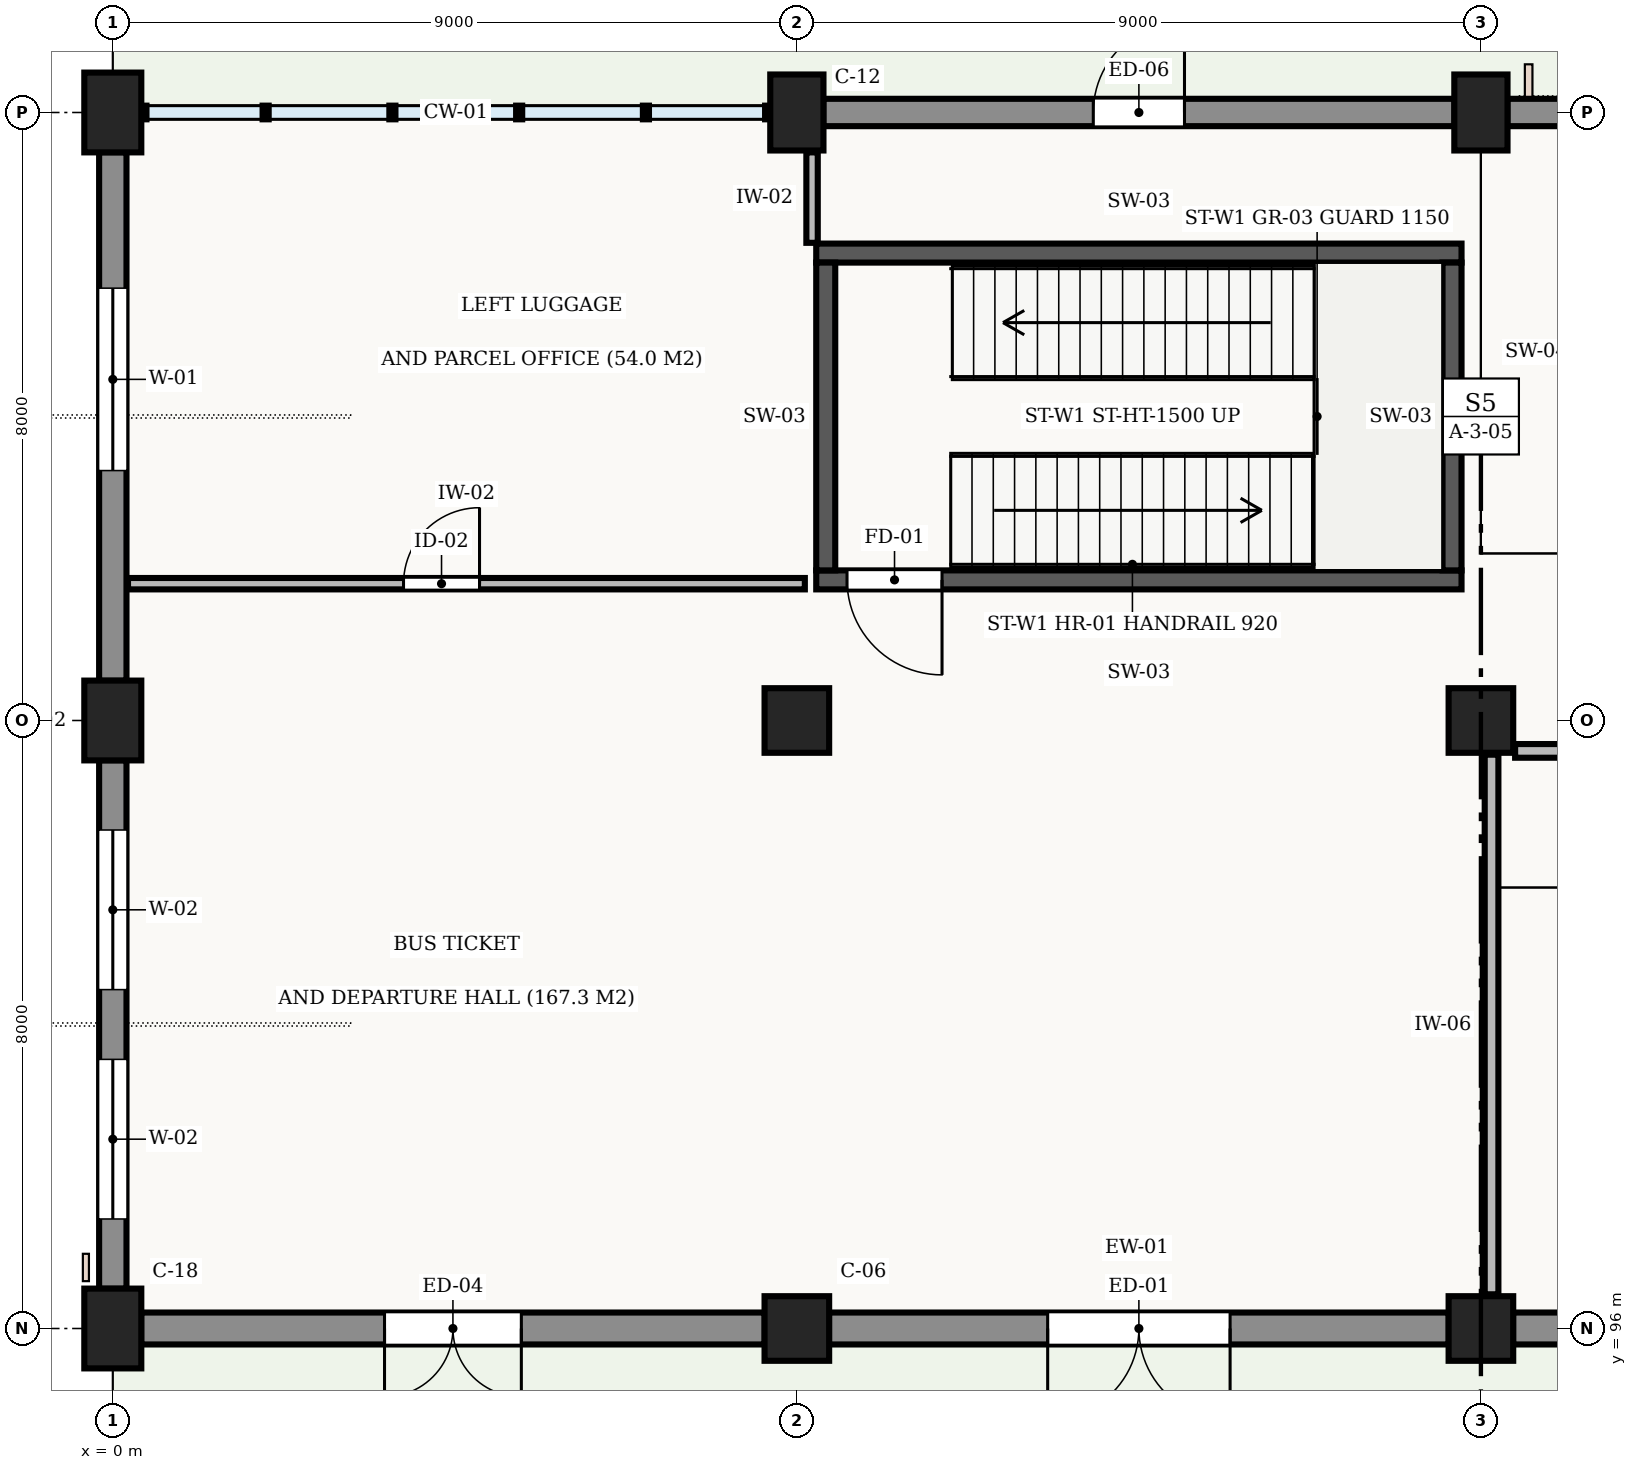
"""IFC4 building model, lengths in metres.
Left out: names, types, materials, properties, quantities, classifications, styles, units other than length and angle.
Written with IfcOpenShell. Run it as: python <this file> out.ifc"""

import sys

from ifc_helpers import new_model, si_unit, direction, frame, frame_2d, origin, origin_2d, place, context, subcontext, project, spatial, rectangle, extrude, element, fill, save


model = new_model("IFC4")
c1 = context("Model", 3, precision=1e-05, world=origin(), true_north=direction((0.0, 1.0)))
c2 = subcontext(c1, "Body", "Model", "MODEL_VIEW")
j1 = project(units=[si_unit("LENGTHUNIT", "METRE"), si_unit("PLANEANGLEUNIT", "RADIAN")], contexts=[c1])
p1 = place(None, origin())
s1 = spatial("IfcSite", under=j1, at=p1, CompositionType="ELEMENT")
p2 = place(p1, origin())
s2 = spatial("IfcBuilding", under=s1, at=p2, CompositionType="ELEMENT")
p3 = place(p2, origin())
s3 = spatial("IfcBuildingStorey", under=s2, at=p3, CompositionType="ELEMENT", Elevation=0.0)
for number, where, z_axis, x_axis in (
    (1, (0.0, 96.0, -0.42), (0.0, 0.0, 1.0), (1.0, 0.0, 0.0)),
    (2, (0.0, 104.0, -0.42), (0.0, 0.0, 1.0), (1.0, 0.0, 0.0)),
    (3, (0.0, 112.0, -0.42), (0.0, 0.0, 1.0), (1.0, 0.0, 0.0)),
):
    element("IfcColumn", number, at=place(p3, frame(where, z_axis=z_axis, x_axis=x_axis)), inside=s3, PredefinedType="COLUMN", context=c2, shape_type="SweptSolid", body=[
        extrude(rectangle(XDim=0.75, YDim=1.05, at=origin_2d()), origin(), (0.0, 0.0, 1.0), 5.82),
    ])
for number, where, z_axis, x_axis in (
    (4, (9.0, 96.0, -0.42), (0.0, 0.0, 1.0), (1.0, 0.0, 0.0)),
    (5, (9.0, 104.0, -0.42), (0.0, 0.0, 1.0), (1.0, 0.0, 0.0)),
):
    element("IfcColumn", number, at=place(p3, frame(where, z_axis=z_axis, x_axis=x_axis)), inside=s3, PredefinedType="COLUMN", context=c2, shape_type="SweptSolid", body=[
        extrude(rectangle(XDim=0.85, YDim=0.85, at=origin_2d()), origin(), (0.0, 0.0, 1.0), 5.82),
    ])
p4 = place(p3, frame((9.0, 112.0, -0.42), z_axis=(0.0, 0.0, 1.0), x_axis=(1.0, 0.0, 0.0)))
e6 = element("IfcColumn", 6, at=p4, inside=s3, PredefinedType="COLUMN", context=c2, shape_type="SweptSolid", body=[
    extrude(rectangle(XDim=0.7, YDim=1.0, at=origin_2d()), origin(), (0.0, 0.0, 1.0), 5.82),
])
for number, where, z_axis, x_axis in (
    (7, (18.0, 96.0, -0.42), (0.0, 0.0, 1.0), (1.0, 0.0, 0.0)),
    (8, (18.0, 104.0, -0.42), (0.0, 0.0, 1.0), (1.0, 0.0, 0.0)),
):
    element("IfcColumn", number, at=place(p3, frame(where, z_axis=z_axis, x_axis=x_axis)), inside=s3, PredefinedType="COLUMN", context=c2, shape_type="SweptSolid", body=[
        extrude(rectangle(XDim=0.85, YDim=0.85, at=origin_2d()), origin(), (0.0, 0.0, 1.0), 5.82),
    ])
p5 = place(p3, frame((18.0, 112.0, -0.42), z_axis=(0.0, 0.0, 1.0), x_axis=(1.0, 0.0, 0.0)))
e9 = element("IfcColumn", 9, at=p5, inside=s3, PredefinedType="COLUMN", context=c2, shape_type="SweptSolid", body=[
    extrude(rectangle(XDim=0.7, YDim=1.0, at=origin_2d()), origin(), (0.0, 0.0, 1.0), 5.82),
])
p6 = place(p3, frame((26.577, 96.0, 0.0), z_axis=(0.0, 0.0, 1.0), x_axis=(-1.0, 0.0, 0.0)))
e10 = element("IfcWall", 10, at=p6, inside=s3, PredefinedType="STANDARD", context=c2, shape_type="SweptSolid", body=[
    extrude(rectangle(XDim=8.154, YDim=0.42, at=frame_2d((4.077, 0.0))), origin(), (0.0, 0.0, 1.0), 4.38),
])
p7 = place(p6, frame((3.177, 0.0, 0.0)))
e11 = element("IfcOpeningElement", 11, at=p7, cuts=e10, PredefinedType="OPENING", context=c2, shape_type="SweptSolid", body=[
    extrude(rectangle(XDim=1.8, YDim=2.4, at=frame_2d((0.9, 1.2))), frame((0.0, 0.222, 0.0), z_axis=(0.0, -1.0, 0.0), x_axis=(1.0, 0.0, 0.0)), (0.0, 0.0, 1.0), 0.444),
])
p8 = place(p3, frame((17.577, 96.0, 0.0), z_axis=(0.0, 0.0, 1.0), x_axis=(-1.0, 0.0, 0.0)))
e12 = element("IfcWall", 12, at=p8, inside=s3, PredefinedType="STANDARD", context=c2, shape_type="SweptSolid", body=[
    extrude(rectangle(XDim=8.154, YDim=0.42, at=frame_2d((4.077, 0.0))), origin(), (0.0, 0.0, 1.0), 4.38),
])
p9 = place(p8, frame((2.877, 0.0, 0.0)))
e13 = element("IfcOpeningElement", 13, at=p9, cuts=e12, PredefinedType="OPENING", context=c2, shape_type="SweptSolid", body=[
    extrude(rectangle(XDim=2.4, YDim=2.7, at=frame_2d((1.2, 1.35))), frame((0.0, 0.222, 0.0), z_axis=(0.0, -1.0, 0.0), x_axis=(1.0, 0.0, 0.0)), (0.0, 0.0, 1.0), 0.444),
])
p10 = place(p3, frame((8.577, 96.0, 0.0), z_axis=(0.0, 0.0, 1.0), x_axis=(-1.0, 0.0, 0.0)))
e14 = element("IfcWall", 14, at=p10, inside=s3, PredefinedType="STANDARD", context=c2, shape_type="SweptSolid", body=[
    extrude(rectangle(XDim=8.204, YDim=0.42, at=frame_2d((4.102, 0.0))), origin(), (0.0, 0.0, 1.0), 4.38),
])
p11 = place(p10, frame((3.202, 0.0, 0.0)))
e15 = element("IfcOpeningElement", 15, at=p11, cuts=e14, PredefinedType="OPENING", context=c2, shape_type="SweptSolid", body=[
    extrude(rectangle(XDim=1.8, YDim=2.4, at=frame_2d((0.9, 1.2))), frame((0.0, 0.222, 0.0), z_axis=(0.0, -1.0, 0.0), x_axis=(1.0, 0.0, 0.0)), (0.0, 0.0, 1.0), 0.444),
])
p12 = place(p3, frame((0.0, 96.523, 0.0), z_axis=(0.0, 0.0, 1.0), x_axis=(0.0, 1.0, 0.0)))
e16 = element("IfcWall", 16, at=p12, inside=s3, PredefinedType="STANDARD", context=c2, shape_type="SweptSolid", body=[
    extrude(rectangle(XDim=6.954, YDim=0.36, at=frame_2d((3.477, 0.0))), origin(), (0.0, 0.0, 1.0), 4.38),
])
p13 = place(p12, frame((0.918, 0.0, 0.9)))
e17 = element("IfcOpeningElement", 17, at=p13, cuts=e16, PredefinedType="OPENING", context=c2, shape_type="SweptSolid", body=[
    extrude(rectangle(XDim=2.1, YDim=3.0, at=frame_2d((1.05, 1.5))), frame((0.0, 0.192, 0.0), z_axis=(0.0, -1.0, 0.0), x_axis=(1.0, 0.0, 0.0)), (0.0, 0.0, 1.0), 0.384),
])
p14 = place(p12, frame((3.936, 0.0, 0.9)))
e18 = element("IfcOpeningElement", 18, at=p14, cuts=e16, PredefinedType="OPENING", context=c2, shape_type="SweptSolid", body=[
    extrude(rectangle(XDim=2.1, YDim=3.0, at=frame_2d((1.05, 1.5))), frame((0.0, 0.192, 0.0), z_axis=(0.0, -1.0, 0.0), x_axis=(1.0, 0.0, 0.0)), (0.0, 0.0, 1.0), 0.384),
])
p15 = place(p3, frame((0.0, 104.523, 0.0), z_axis=(0.0, 0.0, 1.0), x_axis=(0.0, 1.0, 0.0)))
e19 = element("IfcWall", 19, at=p15, inside=s3, PredefinedType="STANDARD", context=c2, shape_type="SweptSolid", body=[
    extrude(rectangle(XDim=6.954, YDim=0.36, at=frame_2d((3.477, 0.0))), origin(), (0.0, 0.0, 1.0), 4.38),
])
p16 = place(p15, frame((2.765, 0.0, 0.9)))
e20 = element("IfcOpeningElement", 20, at=p16, cuts=e19, PredefinedType="OPENING", context=c2, shape_type="SweptSolid", body=[
    extrude(rectangle(XDim=2.4, YDim=3.2, at=frame_2d((1.2, 1.6))), frame((0.0, 0.192, 0.0), z_axis=(0.0, -1.0, 0.0), x_axis=(1.0, 0.0, 0.0)), (0.0, 0.0, 1.0), 0.384),
])
p17 = place(p3, frame((9.348, 112.0, 0.0), z_axis=(0.0, 0.0, 1.0), x_axis=(1.0, 0.0, 0.0)))
e21 = element("IfcWall", 21, at=p17, inside=s3, PredefinedType="STANDARD", context=c2, shape_type="SweptSolid", body=[
    extrude(rectangle(XDim=8.304, YDim=0.36, at=frame_2d((4.152, 0.0))), origin(), (0.0, 0.0, 1.0), 4.38),
])
p18 = place(p17, frame((3.552, 0.0, 0.0)))
e22 = element("IfcOpeningElement", 22, at=p18, cuts=e21, PredefinedType="OPENING", context=c2, shape_type="SweptSolid", body=[
    extrude(rectangle(XDim=1.2, YDim=2.2, at=frame_2d((0.6, 1.1))), frame((0.0, 0.192, 0.0), z_axis=(0.0, -1.0, 0.0), x_axis=(1.0, 0.0, 0.0)), (0.0, 0.0, 1.0), 0.384),
])
p19 = place(p3, frame((18.348, 112.0, 0.0), z_axis=(0.0, 0.0, 1.0), x_axis=(1.0, 0.0, 0.0)))
e23 = element("IfcWall", 23, at=p19, inside=s3, PredefinedType="STANDARD", context=c2, shape_type="SweptSolid", body=[
    extrude(rectangle(XDim=8.304, YDim=0.36, at=frame_2d((4.152, 0.0))), origin(), (0.0, 0.0, 1.0), 4.38),
])
p20 = place(p19, frame((1.368, 0.0, 0.9)))
e24 = element("IfcOpeningElement", 24, at=p20, cuts=e23, PredefinedType="OPENING", context=c2, shape_type="SweptSolid", body=[
    extrude(rectangle(XDim=2.1, YDim=3.0, at=frame_2d((1.05, 1.5))), frame((0.0, 0.192, 0.0), z_axis=(0.0, -1.0, 0.0), x_axis=(1.0, 0.0, 0.0)), (0.0, 0.0, 1.0), 0.384),
])
p21 = place(p19, frame((4.836, 0.0, 0.9)))
e25 = element("IfcOpeningElement", 25, at=p21, cuts=e23, PredefinedType="OPENING", context=c2, shape_type="SweptSolid", body=[
    extrude(rectangle(XDim=2.1, YDim=3.0, at=frame_2d((1.05, 1.5))), frame((0.0, 0.192, 0.0), z_axis=(0.0, -1.0, 0.0), x_axis=(1.0, 0.0, 0.0)), (0.0, 0.0, 1.0), 0.384),
])
p22 = place(p3, frame((9.255, 105.85, 0.0), z_axis=(0.0, 0.0, 1.0), x_axis=(1.0, 0.0, 0.0)))
e26 = element("IfcWall", 26, at=p22, inside=s3, PredefinedType="SHEAR", context=c2, shape_type="SweptSolid", body=[
    extrude(rectangle(XDim=8.49, YDim=0.25, at=frame_2d((4.245, 0.0))), origin(), (0.0, 0.0, 1.0), 5.05),
])
p23 = place(p22, frame((0.405, 0.0, 0.0)))
e27 = element("IfcOpeningElement", 27, at=p23, cuts=e26, PredefinedType="OPENING", context=c2, shape_type="SweptSolid", body=[
    extrude(rectangle(XDim=1.25, YDim=2.15, at=frame_2d((0.625, 1.075))), frame((0.0, 0.137, 0.0), z_axis=(0.0, -1.0, 0.0), x_axis=(1.0, 0.0, 0.0)), (0.0, 0.0, 1.0), 0.274),
])
p24 = place(p3, frame((17.745, 110.15, 0.0), z_axis=(0.0, 0.0, 1.0), x_axis=(-1.0, 0.0, 0.0)))
e28 = element("IfcWall", 28, at=p24, inside=s3, PredefinedType="SHEAR", context=c2, shape_type="SweptSolid", body=[
    extrude(rectangle(XDim=8.49, YDim=0.25, at=frame_2d((4.245, 0.0))), origin(), (0.0, 0.0, 1.0), 5.05),
])
for number, where, z_axis, x_axis in (
    (29, (9.38, 110.025, 0.0), (0.0, 0.0, 1.0), (0.0, -1.0, 0.0)),
    (30, (17.62, 105.975, 0.0), (0.0, 0.0, 1.0), (0.0, 1.0, 0.0)),
):
    element("IfcWall", number, at=place(p3, frame(where, z_axis=z_axis, x_axis=x_axis)), inside=s3, PredefinedType="SHEAR", context=c2, shape_type="SweptSolid", body=[
        extrude(rectangle(XDim=4.05, YDim=0.25, at=frame_2d((2.025, 0.0))), origin(), (0.0, 0.0, 1.0), 5.05),
    ])
p25 = place(p3, frame((18.45, 103.6, 0.0), z_axis=(0.0, 0.0, 1.0), x_axis=(1.0, 0.0, 0.0)))
e31 = element("IfcWall", 31, at=p25, inside=s3, PredefinedType="STANDARD", context=c2, shape_type="SweptSolid", body=[
    extrude(rectangle(XDim=8.1, YDim=0.18, at=frame_2d((4.05, 0.0))), origin(), (0.0, 0.0, 1.0), 5.05),
])
p26 = place(p3, frame((18.14, 96.45, 0.0), z_axis=(0.0, 0.0, 1.0), x_axis=(0.0, 1.0, 0.0)))
e32 = element("IfcWall", 32, at=p26, inside=s3, PredefinedType="STANDARD", context=c2, shape_type="SweptSolid", body=[
    extrude(rectangle(XDim=7.1, YDim=0.18, at=frame_2d((3.55, 0.0))), origin(), (0.0, 0.0, 1.0), 4.23),
])
p27 = place(p3, frame((0.2, 105.8, 0.0), z_axis=(0.0, 0.0, 1.0), x_axis=(1.0, 0.0, 0.0)))
e33 = element("IfcWall", 33, at=p27, inside=s3, PredefinedType="STANDARD", context=c2, shape_type="SweptSolid", body=[
    extrude(rectangle(XDim=8.905, YDim=0.15, at=frame_2d((4.453, 0.0))), origin(), (0.0, 0.0, 1.0), 5.05),
])
p28 = place(p27, frame((3.625, 0.0, 0.0)))
e34 = element("IfcOpeningElement", 34, at=p28, cuts=e33, PredefinedType="OPENING", context=c2, shape_type="SweptSolid", body=[
    extrude(rectangle(XDim=1.0, YDim=2.1, at=frame_2d((0.5, 1.05))), frame((0.0, 0.087, 0.0), z_axis=(0.0, -1.0, 0.0), x_axis=(1.0, 0.0, 0.0)), (0.0, 0.0, 1.0), 0.174),
])
p29 = place(p3, frame((9.2, 110.285, 0.0), z_axis=(0.0, 0.0, 1.0), x_axis=(0.0, 1.0, 0.0)))
e35 = element("IfcWall", 35, at=p29, inside=s3, PredefinedType="STANDARD", context=c2, shape_type="SweptSolid", body=[
    extrude(rectangle(XDim=1.19, YDim=0.15, at=frame_2d((0.595, 0.0))), origin(), (0.0, 0.0, 1.0), 4.33),
])
p30 = place(p9, origin())
e36 = element("IfcDoor", 36, at=p30, inside=s3, OperationType="SINGLE_SWING_LEFT", PredefinedType="DOOR", context=c2, shape_type="SweptSolid", body=[
    extrude(rectangle(XDim=2.4, YDim=2.7, at=frame_2d((1.2, 1.35))), frame((0.0, 0.025, 0.0), z_axis=(0.0, -1.0, 0.0), x_axis=(1.0, 0.0, 0.0)), (0.0, 0.0, 1.0), 0.05),
])
fill(e13, e36)
p31 = place(p11, origin())
e37 = element("IfcDoor", 37, at=p31, inside=s3, OperationType="SINGLE_SWING_LEFT", PredefinedType="DOOR", context=c2, shape_type="SweptSolid", body=[
    extrude(rectangle(XDim=1.8, YDim=2.4, at=frame_2d((0.9, 1.2))), frame((0.0, 0.025, 0.0), z_axis=(0.0, -1.0, 0.0), x_axis=(1.0, 0.0, 0.0)), (0.0, 0.0, 1.0), 0.05),
])
fill(e15, e37)
p32 = place(p13, origin())
e38 = element("IfcWindow", 38, at=p32, inside=s3, PartitioningType="SINGLE_PANEL", PredefinedType="WINDOW", context=c2, shape_type="SweptSolid", body=[
    extrude(rectangle(XDim=2.1, YDim=3.0, at=frame_2d((1.05, 1.5))), frame((0.0, 0.03, 0.0), z_axis=(0.0, -1.0, 0.0), x_axis=(1.0, 0.0, 0.0)), (0.0, 0.0, 1.0), 0.06),
])
fill(e17, e38)
p33 = place(p14, origin())
e39 = element("IfcWindow", 39, at=p33, inside=s3, PartitioningType="SINGLE_PANEL", PredefinedType="WINDOW", context=c2, shape_type="SweptSolid", body=[
    extrude(rectangle(XDim=2.1, YDim=3.0, at=frame_2d((1.05, 1.5))), frame((0.0, 0.03, 0.0), z_axis=(0.0, -1.0, 0.0), x_axis=(1.0, 0.0, 0.0)), (0.0, 0.0, 1.0), 0.06),
])
fill(e18, e39)
p34 = place(p16, origin())
e40 = element("IfcWindow", 40, at=p34, inside=s3, PartitioningType="SINGLE_PANEL", PredefinedType="WINDOW", context=c2, shape_type="SweptSolid", body=[
    extrude(rectangle(XDim=2.4, YDim=3.2, at=frame_2d((1.2, 1.6))), frame((0.0, 0.03, 0.0), z_axis=(0.0, -1.0, 0.0), x_axis=(1.0, 0.0, 0.0)), (0.0, 0.0, 1.0), 0.06),
])
fill(e20, e40)
p35 = place(p18, origin())
e41 = element("IfcDoor", 41, at=p35, inside=s3, OperationType="SINGLE_SWING_RIGHT", PredefinedType="DOOR", context=c2, shape_type="SweptSolid", body=[
    extrude(rectangle(XDim=1.2, YDim=2.2, at=frame_2d((0.6, 1.1))), frame((0.0, 0.025, 0.0), z_axis=(0.0, -1.0, 0.0), x_axis=(1.0, 0.0, 0.0)), (0.0, 0.0, 1.0), 0.05),
])
fill(e22, e41)
p36 = place(p23, frame((1.25, 0.0, 0.0), z_axis=(0.0, 0.0, 1.0), x_axis=(-1.0, 0.0, 0.0)))
e42 = element("IfcDoor", 42, at=p36, inside=s3, OperationType="SINGLE_SWING_LEFT", PredefinedType="DOOR", context=c2, shape_type="SweptSolid", body=[
    extrude(rectangle(XDim=1.25, YDim=2.15, at=frame_2d((0.625, 1.075))), frame((0.0, 0.025, 0.0), z_axis=(0.0, -1.0, 0.0), x_axis=(1.0, 0.0, 0.0)), (0.0, 0.0, 1.0), 0.05),
])
fill(e27, e42)
p37 = place(p28, origin())
e43 = element("IfcDoor", 43, at=p37, inside=s3, OperationType="SINGLE_SWING_RIGHT", PredefinedType="DOOR", context=c2, shape_type="SweptSolid", body=[
    extrude(rectangle(XDim=1.0, YDim=2.1, at=frame_2d((0.5, 1.05))), frame((0.0, 0.025, 0.0), z_axis=(0.0, -1.0, 0.0), x_axis=(1.0, 0.0, 0.0)), (0.0, 0.0, 1.0), 0.05),
])
fill(e34, e43)
save(model, sys.argv[1])
